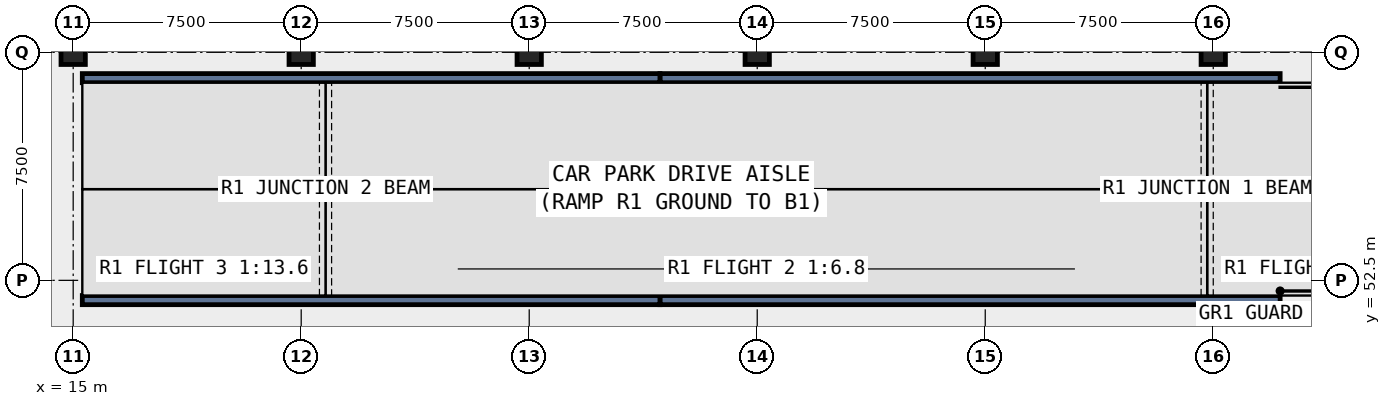
"""IFC4 building model, lengths in metres.
Left out: names, types, materials, properties, quantities, classifications, styles, units other than length and angle.
Written with IfcOpenShell. Run it as: python <this file> out.ifc"""

import sys

from ifc_helpers import new_model, si_unit, direction, frame, frame_2d, origin, origin_2d, place, context, subcontext, project, spatial, rectangle, extrude, element, save


model = new_model("IFC4")
c1 = context("Model", 3, precision=1e-05, world=origin(), true_north=direction((0.0, 1.0)))
c2 = subcontext(c1, "Body", "Model", "MODEL_VIEW")
j1 = project(units=[si_unit("LENGTHUNIT", "METRE"), si_unit("PLANEANGLEUNIT", "RADIAN")], contexts=[c1])
p1 = place(None, origin())
s1 = spatial("IfcSite", under=j1, at=p1, CompositionType="ELEMENT")
p2 = place(p1, origin())
s2 = spatial("IfcBuilding", under=s1, at=p2, CompositionType="ELEMENT")
p3 = place(p2, frame((0.0, 0.0, -5.5)))
s3 = spatial("IfcBuildingStorey", under=s2, at=p3, CompositionType="ELEMENT", Elevation=-5.5)
for number, where, z_axis, x_axis in (
    (1, (15.0, 60.0, -0.42), (0.0, 0.0, 1.0), (1.0, 0.0, 0.0)),
    (2, (22.5, 60.0, -0.42), (0.0, 0.0, 1.0), (1.0, 0.0, 0.0)),
    (3, (30.0, 60.0, -0.42), (0.0, 0.0, 1.0), (1.0, 0.0, 0.0)),
    (4, (37.5, 60.0, -0.42), (0.0, 0.0, 1.0), (1.0, 0.0, 0.0)),
    (5, (45.0, 60.0, -0.42), (0.0, 0.0, 1.0), (1.0, 0.0, 0.0)),
    (6, (52.5, 60.0, -0.42), (0.0, 0.0, 1.0), (1.0, 0.0, 0.0)),
):
    element("IfcColumn", number, at=place(p3, frame(where, z_axis=z_axis, x_axis=x_axis)), inside=s3, PredefinedType="COLUMN", context=c2, shape_type="SweptSolid", body=[
        extrude(rectangle(XDim=0.8, YDim=0.8, at=origin_2d()), origin(), (0.0, 0.0, 1.0), 5.72),
    ])
for number, where, z_axis, x_axis in (
    (7, (34.3, 51.85, 0.0), (0.0, 0.0, 1.0), (1.0, 0.0, 0.0)),
    (8, (34.3, 59.15, 0.0), (0.0, 0.0, 1.0), (1.0, 0.0, 0.0)),
):
    element("IfcWall", number, at=place(p3, frame(where, z_axis=z_axis, x_axis=x_axis)), inside=s3, PredefinedType="SOLIDWALL", context=c2, shape_type="SweptSolid", body=[
        extrude(rectangle(XDim=20.4, YDim=0.3, at=frame_2d((10.2, 0.0))), origin(), (0.0, 0.0, 1.0), 5.5),
    ])
for number, where, z_axis, x_axis in (
    (9, (15.3, 51.85, 0.0), (0.0, 0.0, 1.0), (1.0, 0.0, 0.0)),
    (10, (15.3, 59.15, 0.0), (0.0, 0.0, 1.0), (1.0, 0.0, 0.0)),
):
    element("IfcWall", number, at=place(p3, frame(where, z_axis=z_axis, x_axis=x_axis)), inside=s3, PredefinedType="SOLIDWALL", context=c2, shape_type="SweptSolid", body=[
        extrude(rectangle(XDim=19.0, YDim=0.3, at=frame_2d((9.5, 0.0))), origin(), (0.0, 0.0, 1.0), 4.9),
    ])
save(model, sys.argv[1])
